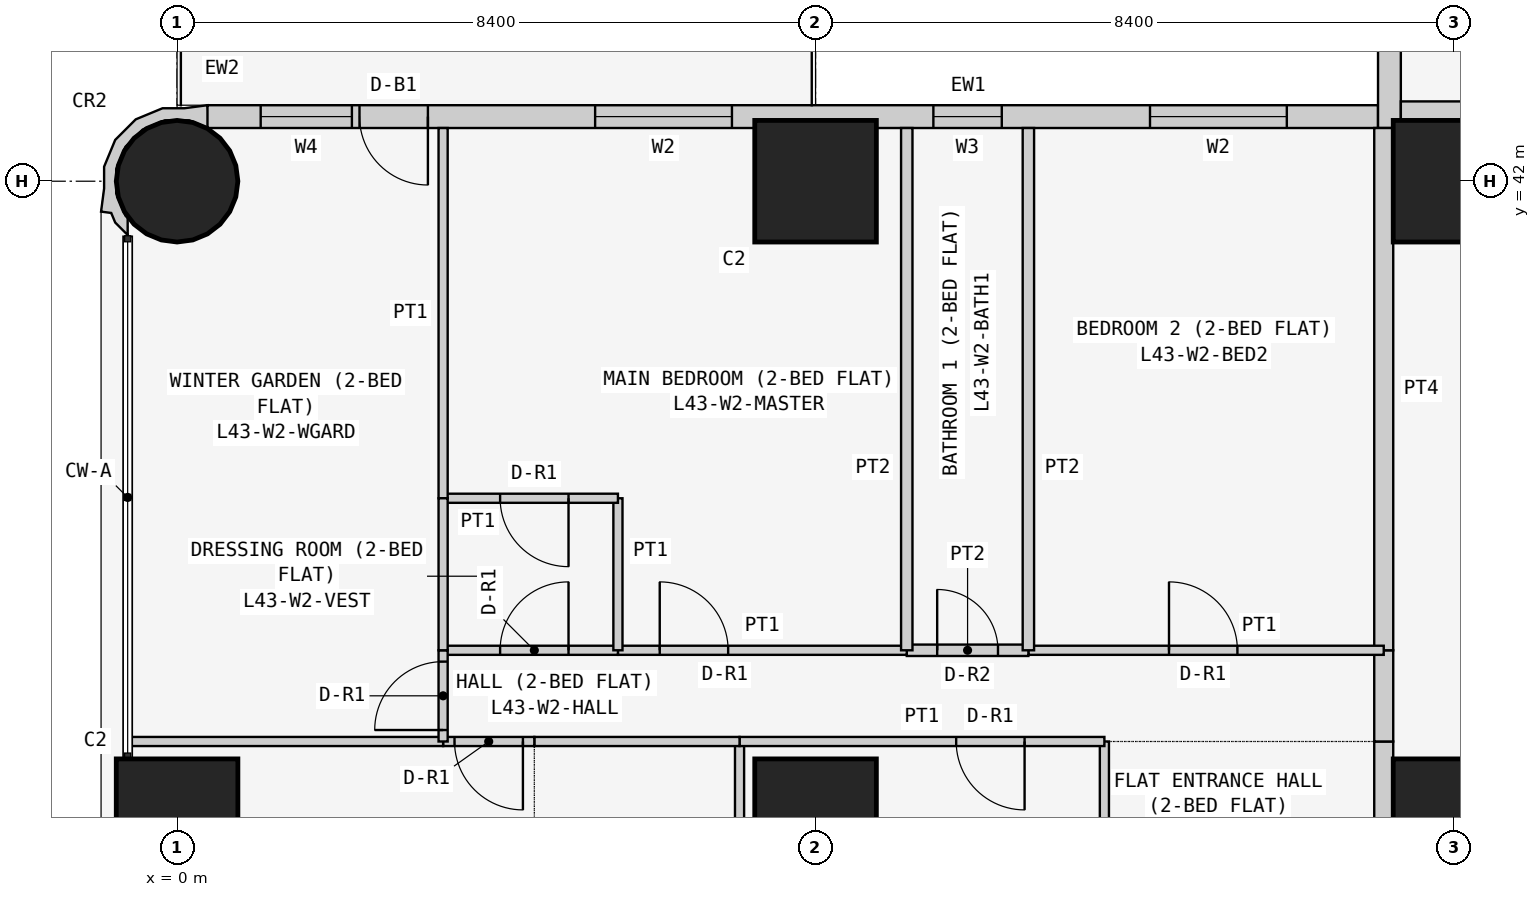
"""IFC4 building model, lengths in metres.
Left out: names, types, materials, properties, quantities, classifications, styles, units other than length and angle.
Written with IfcOpenShell. Run it as: python <this file> out.ifc"""

import sys

from ifc_helpers import new_model, si_unit, direction, frame, frame_2d, origin, origin_2d, place, context, subcontext, project, spatial, polyline, rectangle, circle, outline, extrude, element, fill, save


model = new_model("IFC4")
c1 = context("Model", 3, precision=1e-05, world=origin(), true_north=direction((0.0, 1.0)))
c2 = subcontext(c1, "Body", "Model", "MODEL_VIEW")
j1 = project(units=[si_unit("LENGTHUNIT", "METRE"), si_unit("PLANEANGLEUNIT", "RADIAN")], contexts=[c1])
p1 = place(None, origin())
s1 = spatial("IfcSite", under=j1, at=p1, CompositionType="ELEMENT")
p2 = place(p1, origin())
s2 = spatial("IfcBuilding", under=s1, at=p2, CompositionType="ELEMENT")
p3 = place(p2, frame((0.0, 0.0, 166.5)))
s3 = spatial("IfcBuildingStorey", under=s2, at=p3, CompositionType="ELEMENT", Elevation=166.5)
p4 = place(p3, frame((0.0, 33.6, 0.0), z_axis=(0.0, 0.0, 1.0), x_axis=(1.0, 0.0, 0.0)))
e1 = element("IfcColumn", 1, at=p4, inside=s3, PredefinedType="COLUMN", context=c2, shape_type="SweptSolid", body=[
    extrude(rectangle(XDim=1.6, YDim=1.6, at=origin_2d()), origin(), (0.0, 0.0, 1.0), 3.6),
])
p5 = place(p3, frame((0.0, 42.0, 0.0), z_axis=(0.0, 0.0, 1.0), x_axis=(1.0, 0.0, 0.0)))
e2 = element("IfcColumn", 2, at=p5, inside=s3, PredefinedType="COLUMN", context=c2, shape_type="SweptSolid", body=[
    extrude(circle(Radius=0.8, at=origin_2d()), origin(), (0.0, 0.0, 1.0), 3.6),
])
for number, where, z_axis, x_axis in (
    (3, (8.4, 33.6, 0.0), (0.0, 0.0, 1.0), (1.0, 0.0, 0.0)),
    (4, (8.4, 42.0, 0.0), (0.0, 0.0, 1.0), (1.0, 0.0, 0.0)),
    (5, (16.8, 33.6, 0.0), (0.0, 0.0, 1.0), (1.0, 0.0, 0.0)),
    (6, (16.8, 42.0, 0.0), (0.0, 0.0, 1.0), (1.0, 0.0, 0.0)),
):
    element("IfcColumn", number, at=place(p3, frame(where, z_axis=z_axis, x_axis=x_axis)), inside=s3, PredefinedType="COLUMN", context=c2, shape_type="SweptSolid", body=[
        extrude(rectangle(XDim=1.6, YDim=1.6, at=origin_2d()), origin(), (0.0, 0.0, 1.0), 3.6),
    ])
p6 = place(p3, frame((15.8, 42.85, 0.0), z_axis=(0.0, 0.0, 1.0), x_axis=(-1.0, 0.0, 0.0)))
e7 = element("IfcWall", 7, at=p6, inside=s3, PredefinedType="SOLIDWALL", context=c2, shape_type="SweptSolid", body=[
    extrude(rectangle(XDim=15.4, YDim=0.3, at=frame_2d((7.7, 0.0))), origin(), (0.0, 0.0, 1.0), 3.45),
])
p7 = place(p6, frame((1.2, 0.0, 0.9)))
e8 = element("IfcOpeningElement", 8, at=p7, cuts=e7, PredefinedType="OPENING", context=c2, shape_type="SweptSolid", body=[
    extrude(rectangle(XDim=1.8, YDim=1.5, at=frame_2d((0.9, 0.75))), frame((0.0, 0.16, 0.0), z_axis=(0.0, -1.0, 0.0), x_axis=(1.0, 0.0, 0.0)), (0.0, 0.0, 1.0), 0.32),
])
p8 = place(p6, frame((4.95, 0.0, 1.5)))
e9 = element("IfcOpeningElement", 9, at=p8, cuts=e7, PredefinedType="OPENING", context=c2, shape_type="SweptSolid", body=[
    extrude(rectangle(XDim=0.9, YDim=0.7, at=frame_2d((0.45, 0.35))), frame((0.0, 0.16, 0.0), z_axis=(0.0, -1.0, 0.0), x_axis=(1.0, 0.0, 0.0)), (0.0, 0.0, 1.0), 0.32),
])
p9 = place(p6, frame((8.5, 0.0, 0.9)))
e10 = element("IfcOpeningElement", 10, at=p9, cuts=e7, PredefinedType="OPENING", context=c2, shape_type="SweptSolid", body=[
    extrude(rectangle(XDim=1.8, YDim=1.5, at=frame_2d((0.9, 0.75))), frame((0.0, 0.16, 0.0), z_axis=(0.0, -1.0, 0.0), x_axis=(1.0, 0.0, 0.0)), (0.0, 0.0, 1.0), 0.32),
])
p10 = place(p6, frame((12.5, 0.0, 0.0)))
e11 = element("IfcOpeningElement", 11, at=p10, cuts=e7, PredefinedType="OPENING", context=c2, shape_type="SweptSolid", body=[
    extrude(rectangle(XDim=0.9, YDim=2.4, at=frame_2d((0.45, 1.2))), frame((0.0, 0.16, 0.0), z_axis=(0.0, -1.0, 0.0), x_axis=(1.0, 0.0, 0.0)), (0.0, 0.0, 1.0), 0.32),
])
p11 = place(p6, frame((13.5, 0.0, 0.9)))
e12 = element("IfcOpeningElement", 12, at=p11, cuts=e7, PredefinedType="OPENING", context=c2, shape_type="SweptSolid", body=[
    extrude(rectangle(XDim=1.2, YDim=1.5, at=frame_2d((0.6, 0.75))), frame((0.0, 0.16, 0.0), z_axis=(0.0, -1.0, 0.0), x_axis=(1.0, 0.0, 0.0)), (0.0, 0.0, 1.0), 0.32),
])
p12 = place(p3, frame((15.95, 50.0, 0.0), z_axis=(0.0, 0.0, 1.0), x_axis=(0.0, -1.0, 0.0)))
e13 = element("IfcWall", 13, at=p12, inside=s3, PredefinedType="SOLIDWALL", context=c2, shape_type="SweptSolid", body=[
    extrude(rectangle(XDim=7.3, YDim=0.3, at=frame_2d((3.65, 0.0))), origin(), (0.0, 0.0, 1.0), 3.45),
])
p13 = place(p12, frame((3.1, 0.0, 0.9)))
e14 = element("IfcOpeningElement", 14, at=p13, cuts=e13, PredefinedType="OPENING", context=c2, shape_type="SweptSolid", body=[
    extrude(rectangle(XDim=2.4, YDim=1.5, at=frame_2d((1.2, 0.75))), frame((0.0, 0.16, 0.0), z_axis=(0.0, -1.0, 0.0), x_axis=(1.0, 0.0, 0.0)), (0.0, 0.0, 1.0), 0.32),
])
p14 = place(p12, frame((0.75, 0.0, 0.9)))
e15 = element("IfcOpeningElement", 15, at=p14, cuts=e13, PredefinedType="OPENING", context=c2, shape_type="SweptSolid", body=[
    extrude(rectangle(XDim=1.2, YDim=1.5, at=frame_2d((0.6, 0.75))), frame((0.0, 0.16, 0.0), z_axis=(0.0, -1.0, 0.0), x_axis=(1.0, 0.0, 0.0)), (0.0, 0.0, 1.0), 0.32),
])
p15 = place(p3, frame((0.327, 42.817, 0.0), z_axis=(0.0, 0.0, 1.0), x_axis=(-0.93923434088, 0.343276641956, 0.0)))
e16 = element("IfcWall", 16, at=p15, inside=s3, PredefinedType="SOLIDWALL", context=c2, shape_type="SweptSolid", body=[
    extrude(outline(polyline([(-0.006, -0.197), (0.266, -0.055), (0.535, 0.044), (0.816, 0.302), (0.977, 0.648), (0.994, 1.03), (0.895, 1.299), (0.828, 1.598), (0.697, 1.569), (0.604, 1.67), (0.394, 1.767), (0.471, 1.556), (0.509, 1.539), (0.724, 1.304), (0.833, 1.005), (0.82, 0.687), (0.686, 0.397), (0.451, 0.182), (0.152, 0.073), (-0.116, 0.084), (-0.127, 0.078), (-0.146, 0.071), (-0.006, -0.197)])), origin(), (0.0, 0.0, 1.0), 3.45),
])
p16 = place(p3, frame((16.1, 42.925, 0.0), z_axis=(0.0, 0.0, 1.0), x_axis=(1.0, 0.0, 0.0)))
e17 = element("IfcWall", 17, at=p16, inside=s3, PredefinedType="PARTITIONING", context=c2, shape_type="SweptSolid", body=[
    extrude(rectangle(XDim=6.871, YDim=0.25, at=frame_2d((3.436, 0.0))), origin(), (0.0, 0.0, 1.0), 3.45),
])
p17 = place(p3, frame((15.875, 29.4, 0.0), z_axis=(0.0, 0.0, 1.0), x_axis=(0.0, 1.0, 0.0)))
e18 = element("IfcWall", 18, at=p17, inside=s3, PredefinedType="PARTITIONING", context=c2, shape_type="SweptSolid", body=[
    extrude(rectangle(XDim=5.229, YDim=0.25, at=frame_2d((2.615, 0.0))), origin(), (0.0, 0.0, 1.0), 3.45),
])
p18 = place(p17, frame((2.1, 0.0, 0.0)))
e19 = element("IfcOpeningElement", 19, at=p18, cuts=e18, PredefinedType="OPENING", context=c2, shape_type="SweptSolid", body=[
    extrude(rectangle(XDim=1.0, YDim=2.1, at=frame_2d((0.5, 1.05))), frame((0.0, 0.135, 0.0), z_axis=(0.0, -1.0, 0.0), x_axis=(1.0, 0.0, 0.0)), (0.0, 0.0, 1.0), 0.27),
])
p19 = place(p3, frame((15.875, 34.629, 0.0), z_axis=(0.0, 0.0, 1.0), x_axis=(0.0, 1.0, 0.0)))
e20 = element("IfcWall", 20, at=p19, inside=s3, PredefinedType="PARTITIONING", context=c2, shape_type="SweptSolid", body=[
    extrude(rectangle(XDim=1.2, YDim=0.25, at=frame_2d((0.6, 0.0))), origin(), (0.0, 0.0, 1.0), 3.45),
])
p20 = place(p3, frame((15.875, 35.829, 0.0), z_axis=(0.0, 0.0, 1.0), x_axis=(0.0, 1.0, 0.0)))
e21 = element("IfcWall", 21, at=p20, inside=s3, PredefinedType="PARTITIONING", context=c2, shape_type="SweptSolid", body=[
    extrude(rectangle(XDim=6.871, YDim=0.25, at=frame_2d((3.436, 0.0))), origin(), (0.0, 0.0, 1.0), 3.45),
])
for number, where, z_axis, x_axis in (
    (22, (12.2, 29.4, 0.0), (0.0, 0.0, 1.0), (0.0, 1.0, 0.0)),
    (23, (7.4, 29.4, 0.0), (0.0, 0.0, 1.0), (0.0, 1.0, 0.0)),
):
    element("IfcWall", number, at=place(p3, frame(where, z_axis=z_axis, x_axis=x_axis)), inside=s3, PredefinedType="PARTITIONING", context=c2, shape_type="SweptSolid", body=[
        extrude(rectangle(XDim=5.229, YDim=0.12, at=frame_2d((2.615, 0.0))), origin(), (0.0, 0.0, 1.0), 3.45),
    ])
p21 = place(p3, frame((7.4, 34.629, 0.0), z_axis=(0.0, 0.0, 1.0), x_axis=(1.0, 0.0, 0.0)))
e24 = element("IfcWall", 24, at=p21, inside=s3, PredefinedType="PARTITIONING", context=c2, shape_type="SweptSolid", body=[
    extrude(rectangle(XDim=4.8, YDim=0.12, at=frame_2d((2.4, 0.0))), origin(), (0.0, 0.0, 1.0), 3.45),
])
p22 = place(p21, frame((2.85, 0.0, 0.0)))
e25 = element("IfcOpeningElement", 25, at=p22, cuts=e24, PredefinedType="OPENING", context=c2, shape_type="SweptSolid", body=[
    extrude(rectangle(XDim=0.9, YDim=2.1, at=frame_2d((0.45, 1.05))), frame((0.0, 0.07, 0.0), z_axis=(0.0, -1.0, 0.0), x_axis=(1.0, 0.0, 0.0)), (0.0, 0.0, 1.0), 0.14),
])
p23 = place(p3, frame((4.7, 34.629, 0.0), z_axis=(0.0, 0.0, 1.0), x_axis=(1.0, 0.0, 0.0)))
e26 = element("IfcWall", 26, at=p23, inside=s3, PredefinedType="PARTITIONING", context=c2, shape_type="SweptSolid", body=[
    extrude(rectangle(XDim=2.7, YDim=0.12, at=frame_2d((1.35, 0.0))), origin(), (0.0, 0.0, 1.0), 3.45),
])
p24 = place(p3, frame((3.5, 34.629, 0.0), z_axis=(0.0, 0.0, 1.0), x_axis=(1.0, 0.0, 0.0)))
e27 = element("IfcWall", 27, at=p24, inside=s3, PredefinedType="PARTITIONING", context=c2, shape_type="SweptSolid", body=[
    extrude(rectangle(XDim=1.2, YDim=0.12, at=frame_2d((0.6, 0.0))), origin(), (0.0, 0.0, 1.0), 3.45),
])
p25 = place(p24, frame((0.15, 0.0, 0.0)))
e28 = element("IfcOpeningElement", 28, at=p25, cuts=e27, PredefinedType="OPENING", context=c2, shape_type="SweptSolid", body=[
    extrude(rectangle(XDim=0.9, YDim=2.1, at=frame_2d((0.45, 1.05))), frame((0.0, 0.07, 0.0), z_axis=(0.0, -1.0, 0.0), x_axis=(1.0, 0.0, 0.0)), (0.0, 0.0, 1.0), 0.14),
])
p26 = place(p3, frame((-0.65, 34.629, 0.0), z_axis=(0.0, 0.0, 1.0), x_axis=(1.0, 0.0, 0.0)))
e29 = element("IfcWall", 29, at=p26, inside=s3, PredefinedType="PARTITIONING", context=c2, shape_type="SweptSolid", body=[
    extrude(rectangle(XDim=4.15, YDim=0.12, at=frame_2d((2.075, 0.0))), origin(), (0.0, 0.0, 1.0), 3.45),
])
p27 = place(p3, frame((11.2, 35.829, 0.0), z_axis=(0.0, 0.0, 1.0), x_axis=(1.0, 0.0, 0.0)))
e30 = element("IfcWall", 30, at=p27, inside=s3, PredefinedType="PARTITIONING", context=c2, shape_type="SweptSolid", body=[
    extrude(rectangle(XDim=4.675, YDim=0.12, at=frame_2d((2.337, 0.0))), origin(), (0.0, 0.0, 1.0), 3.45),
])
p28 = place(p27, frame((1.85, 0.0, 0.0)))
e31 = element("IfcOpeningElement", 31, at=p28, cuts=e30, PredefinedType="OPENING", context=c2, shape_type="SweptSolid", body=[
    extrude(rectangle(XDim=0.9, YDim=2.1, at=frame_2d((0.45, 1.05))), frame((0.0, 0.07, 0.0), z_axis=(0.0, -1.0, 0.0), x_axis=(1.0, 0.0, 0.0)), (0.0, 0.0, 1.0), 0.14),
])
p29 = place(p3, frame((9.6, 35.829, 0.0), z_axis=(0.0, 0.0, 1.0), x_axis=(1.0, 0.0, 0.0)))
e32 = element("IfcWall", 32, at=p29, inside=s3, PredefinedType="PARTITIONING", context=c2, shape_type="SweptSolid", body=[
    extrude(rectangle(XDim=1.6, YDim=0.15, at=frame_2d((0.8, 0.0))), origin(), (0.0, 0.0, 1.0), 3.45),
])
p30 = place(p29, frame((0.4, 0.0, 0.0)))
e33 = element("IfcOpeningElement", 33, at=p30, cuts=e32, PredefinedType="OPENING", context=c2, shape_type="SweptSolid", body=[
    extrude(rectangle(XDim=0.8, YDim=2.1, at=frame_2d((0.4, 1.05))), frame((0.0, 0.085, 0.0), z_axis=(0.0, -1.0, 0.0), x_axis=(1.0, 0.0, 0.0)), (0.0, 0.0, 1.0), 0.17),
])
p31 = place(p3, frame((5.8, 35.829, 0.0), z_axis=(0.0, 0.0, 1.0), x_axis=(1.0, 0.0, 0.0)))
e34 = element("IfcWall", 34, at=p31, inside=s3, PredefinedType="PARTITIONING", context=c2, shape_type="SweptSolid", body=[
    extrude(rectangle(XDim=3.8, YDim=0.12, at=frame_2d((1.9, 0.0))), origin(), (0.0, 0.0, 1.0), 3.45),
])
p32 = place(p31, frame((0.55, 0.0, 0.0)))
e35 = element("IfcOpeningElement", 35, at=p32, cuts=e34, PredefinedType="OPENING", context=c2, shape_type="SweptSolid", body=[
    extrude(rectangle(XDim=0.9, YDim=2.1, at=frame_2d((0.45, 1.05))), frame((0.0, 0.07, 0.0), z_axis=(0.0, -1.0, 0.0), x_axis=(1.0, 0.0, 0.0)), (0.0, 0.0, 1.0), 0.14),
])
p33 = place(p3, frame((3.5, 35.829, 0.0), z_axis=(0.0, 0.0, 1.0), x_axis=(1.0, 0.0, 0.0)))
e36 = element("IfcWall", 36, at=p33, inside=s3, PredefinedType="PARTITIONING", context=c2, shape_type="SweptSolid", body=[
    extrude(rectangle(XDim=2.3, YDim=0.12, at=frame_2d((1.15, 0.0))), origin(), (0.0, 0.0, 1.0), 3.45),
])
p34 = place(p33, frame((0.75, 0.0, 0.0)))
e37 = element("IfcOpeningElement", 37, at=p34, cuts=e36, PredefinedType="OPENING", context=c2, shape_type="SweptSolid", body=[
    extrude(rectangle(XDim=0.9, YDim=2.1, at=frame_2d((0.45, 1.05))), frame((0.0, 0.07, 0.0), z_axis=(0.0, -1.0, 0.0), x_axis=(1.0, 0.0, 0.0)), (0.0, 0.0, 1.0), 0.14),
])
p35 = place(p3, frame((3.5, 34.629, 0.0), z_axis=(0.0, 0.0, 1.0), x_axis=(0.0, 1.0, 0.0)))
e38 = element("IfcWall", 38, at=p35, inside=s3, PredefinedType="PARTITIONING", context=c2, shape_type="SweptSolid", body=[
    extrude(rectangle(XDim=1.2, YDim=0.12, at=frame_2d((0.6, 0.0))), origin(), (0.0, 0.0, 1.0), 3.45),
])
p36 = place(p35, frame((0.151, 0.0, 0.0)))
e39 = element("IfcOpeningElement", 39, at=p36, cuts=e38, PredefinedType="OPENING", context=c2, shape_type="SweptSolid", body=[
    extrude(rectangle(XDim=0.9, YDim=2.1, at=frame_2d((0.45, 1.05))), frame((0.0, 0.07, 0.0), z_axis=(0.0, -1.0, 0.0), x_axis=(1.0, 0.0, 0.0)), (0.0, 0.0, 1.0), 0.14),
])
for number, where, z_axis, x_axis in (
    (40, (11.2, 35.829, 0.0), (0.0, 0.0, 1.0), (0.0, 1.0, 0.0)),
    (41, (9.6, 35.829, 0.0), (0.0, 0.0, 1.0), (0.0, 1.0, 0.0)),
):
    element("IfcWall", number, at=place(p3, frame(where, z_axis=z_axis, x_axis=x_axis)), inside=s3, PredefinedType="PARTITIONING", context=c2, shape_type="SweptSolid", body=[
        extrude(rectangle(XDim=6.871, YDim=0.15, at=frame_2d((3.436, 0.0))), origin(), (0.0, 0.0, 1.0), 3.45),
    ])
p37 = place(p3, frame((5.8, 35.829, 0.0), z_axis=(0.0, 0.0, 1.0), x_axis=(0.0, 1.0, 0.0)))
e42 = element("IfcWall", 42, at=p37, inside=s3, PredefinedType="PARTITIONING", context=c2, shape_type="SweptSolid", body=[
    extrude(rectangle(XDim=2.0, YDim=0.12, at=frame_2d((1.0, 0.0))), origin(), (0.0, 0.0, 1.0), 3.45),
])
p38 = place(p3, frame((5.8, 37.829, 0.0), z_axis=(0.0, 0.0, 1.0), x_axis=(-1.0, 0.0, 0.0)))
e43 = element("IfcWall", 43, at=p38, inside=s3, PredefinedType="PARTITIONING", context=c2, shape_type="SweptSolid", body=[
    extrude(rectangle(XDim=2.3, YDim=0.12, at=frame_2d((1.15, 0.0))), origin(), (0.0, 0.0, 1.0), 3.45),
])
p39 = place(p38, frame((0.65, 0.0, 0.0)))
e44 = element("IfcOpeningElement", 44, at=p39, cuts=e43, PredefinedType="OPENING", context=c2, shape_type="SweptSolid", body=[
    extrude(rectangle(XDim=0.9, YDim=2.1, at=frame_2d((0.45, 1.05))), frame((0.0, 0.07, 0.0), z_axis=(0.0, -1.0, 0.0), x_axis=(1.0, 0.0, 0.0)), (0.0, 0.0, 1.0), 0.14),
])
p40 = place(p3, frame((3.5, 37.829, 0.0), z_axis=(0.0, 0.0, 1.0), x_axis=(0.0, 1.0, 0.0)))
e45 = element("IfcWall", 45, at=p40, inside=s3, PredefinedType="PARTITIONING", context=c2, shape_type="SweptSolid", body=[
    extrude(rectangle(XDim=4.871, YDim=0.12, at=frame_2d((2.436, 0.0))), origin(), (0.0, 0.0, 1.0), 3.45),
])
p41 = place(p3, frame((3.5, 35.829, 0.0), z_axis=(0.0, 0.0, 1.0), x_axis=(0.0, 1.0, 0.0)))
e46 = element("IfcWall", 46, at=p41, inside=s3, PredefinedType="PARTITIONING", context=c2, shape_type="SweptSolid", body=[
    extrude(rectangle(XDim=2.0, YDim=0.12, at=frame_2d((1.0, 0.0))), origin(), (0.0, 0.0, 1.0), 3.45),
])
p42 = place(p7, origin())
e47 = element("IfcWindow", 47, at=p42, inside=s3, PartitioningType="SINGLE_PANEL", PredefinedType="WINDOW", context=c2, shape_type="SweptSolid", body=[
    extrude(rectangle(XDim=1.8, YDim=1.5, at=frame_2d((0.9, 0.75))), frame((0.0, 0.03, 0.0), z_axis=(0.0, -1.0, 0.0), x_axis=(1.0, 0.0, 0.0)), (0.0, 0.0, 1.0), 0.06),
])
fill(e8, e47)
p43 = place(p8, origin())
e48 = element("IfcWindow", 48, at=p43, inside=s3, PartitioningType="SINGLE_PANEL", PredefinedType="WINDOW", context=c2, shape_type="SweptSolid", body=[
    extrude(rectangle(XDim=0.9, YDim=0.7, at=frame_2d((0.45, 0.35))), frame((0.0, 0.03, 0.0), z_axis=(0.0, -1.0, 0.0), x_axis=(1.0, 0.0, 0.0)), (0.0, 0.0, 1.0), 0.06),
])
fill(e9, e48)
p44 = place(p9, origin())
e49 = element("IfcWindow", 49, at=p44, inside=s3, PartitioningType="SINGLE_PANEL", PredefinedType="WINDOW", context=c2, shape_type="SweptSolid", body=[
    extrude(rectangle(XDim=1.8, YDim=1.5, at=frame_2d((0.9, 0.75))), frame((0.0, 0.03, 0.0), z_axis=(0.0, -1.0, 0.0), x_axis=(1.0, 0.0, 0.0)), (0.0, 0.0, 1.0), 0.06),
])
fill(e10, e49)
p45 = place(p10, origin())
e50 = element("IfcDoor", 50, at=p45, inside=s3, OperationType="SINGLE_SWING_LEFT", PredefinedType="DOOR", context=c2, shape_type="SweptSolid", body=[
    extrude(rectangle(XDim=0.9, YDim=2.4, at=frame_2d((0.45, 1.2))), frame((0.0, 0.025, 0.0), z_axis=(0.0, -1.0, 0.0), x_axis=(1.0, 0.0, 0.0)), (0.0, 0.0, 1.0), 0.05),
])
fill(e11, e50)
p46 = place(p11, origin())
e51 = element("IfcWindow", 51, at=p46, inside=s3, PartitioningType="SINGLE_PANEL", PredefinedType="WINDOW", context=c2, shape_type="SweptSolid", body=[
    extrude(rectangle(XDim=1.2, YDim=1.5, at=frame_2d((0.6, 0.75))), frame((0.0, 0.03, 0.0), z_axis=(0.0, -1.0, 0.0), x_axis=(1.0, 0.0, 0.0)), (0.0, 0.0, 1.0), 0.06),
])
fill(e12, e51)
p47 = place(p22, frame((0.9, 0.0, 0.0), z_axis=(0.0, 0.0, 1.0), x_axis=(-1.0, 0.0, 0.0)))
e52 = element("IfcDoor", 52, at=p47, inside=s3, OperationType="SINGLE_SWING_LEFT", PredefinedType="DOOR", context=c2, shape_type="SweptSolid", body=[
    extrude(rectangle(XDim=0.9, YDim=2.1, at=frame_2d((0.45, 1.05))), frame((0.0, 0.025, 0.0), z_axis=(0.0, -1.0, 0.0), x_axis=(1.0, 0.0, 0.0)), (0.0, 0.0, 1.0), 0.05),
])
fill(e25, e52)
p48 = place(p25, frame((0.9, 0.0, 0.0), z_axis=(0.0, 0.0, 1.0), x_axis=(-1.0, 0.0, 0.0)))
e53 = element("IfcDoor", 53, at=p48, inside=s3, OperationType="SINGLE_SWING_LEFT", PredefinedType="DOOR", context=c2, shape_type="SweptSolid", body=[
    extrude(rectangle(XDim=0.9, YDim=2.1, at=frame_2d((0.45, 1.05))), frame((0.0, 0.025, 0.0), z_axis=(0.0, -1.0, 0.0), x_axis=(1.0, 0.0, 0.0)), (0.0, 0.0, 1.0), 0.05),
])
fill(e28, e53)
p49 = place(p28, origin())
e54 = element("IfcDoor", 54, at=p49, inside=s3, OperationType="SINGLE_SWING_LEFT", PredefinedType="DOOR", context=c2, shape_type="SweptSolid", body=[
    extrude(rectangle(XDim=0.9, YDim=2.1, at=frame_2d((0.45, 1.05))), frame((0.0, 0.025, 0.0), z_axis=(0.0, -1.0, 0.0), x_axis=(1.0, 0.0, 0.0)), (0.0, 0.0, 1.0), 0.05),
])
fill(e31, e54)
p50 = place(p30, origin())
e55 = element("IfcDoor", 55, at=p50, inside=s3, OperationType="SINGLE_SWING_LEFT", PredefinedType="DOOR", context=c2, shape_type="SweptSolid", body=[
    extrude(rectangle(XDim=0.8, YDim=2.1, at=frame_2d((0.4, 1.05))), frame((0.0, 0.025, 0.0), z_axis=(0.0, -1.0, 0.0), x_axis=(1.0, 0.0, 0.0)), (0.0, 0.0, 1.0), 0.05),
])
fill(e33, e55)
p51 = place(p32, origin())
e56 = element("IfcDoor", 56, at=p51, inside=s3, OperationType="SINGLE_SWING_LEFT", PredefinedType="DOOR", context=c2, shape_type="SweptSolid", body=[
    extrude(rectangle(XDim=0.9, YDim=2.1, at=frame_2d((0.45, 1.05))), frame((0.0, 0.025, 0.0), z_axis=(0.0, -1.0, 0.0), x_axis=(1.0, 0.0, 0.0)), (0.0, 0.0, 1.0), 0.05),
])
fill(e35, e56)
p52 = place(p34, origin())
e57 = element("IfcDoor", 57, at=p52, inside=s3, OperationType="SINGLE_SWING_RIGHT", PredefinedType="DOOR", context=c2, shape_type="SweptSolid", body=[
    extrude(rectangle(XDim=0.9, YDim=2.1, at=frame_2d((0.45, 1.05))), frame((0.0, 0.025, 0.0), z_axis=(0.0, -1.0, 0.0), x_axis=(1.0, 0.0, 0.0)), (0.0, 0.0, 1.0), 0.05),
])
fill(e37, e57)
p53 = place(p39, origin())
e58 = element("IfcDoor", 58, at=p53, inside=s3, OperationType="SINGLE_SWING_LEFT", PredefinedType="DOOR", context=c2, shape_type="SweptSolid", body=[
    extrude(rectangle(XDim=0.9, YDim=2.1, at=frame_2d((0.45, 1.05))), frame((0.0, 0.025, 0.0), z_axis=(0.0, -1.0, 0.0), x_axis=(1.0, 0.0, 0.0)), (0.0, 0.0, 1.0), 0.05),
])
fill(e44, e58)
p54 = place(p36, origin())
e59 = element("IfcDoor", 59, at=p54, inside=s3, OperationType="SINGLE_SWING_LEFT", PredefinedType="DOOR", context=c2, shape_type="SweptSolid", body=[
    extrude(rectangle(XDim=0.9, YDim=2.1, at=frame_2d((0.45, 1.05))), frame((0.0, 0.025, 0.0), z_axis=(0.0, -1.0, 0.0), x_axis=(1.0, 0.0, 0.0)), (0.0, 0.0, 1.0), 0.05),
])
fill(e39, e59)
save(model, sys.argv[1])
